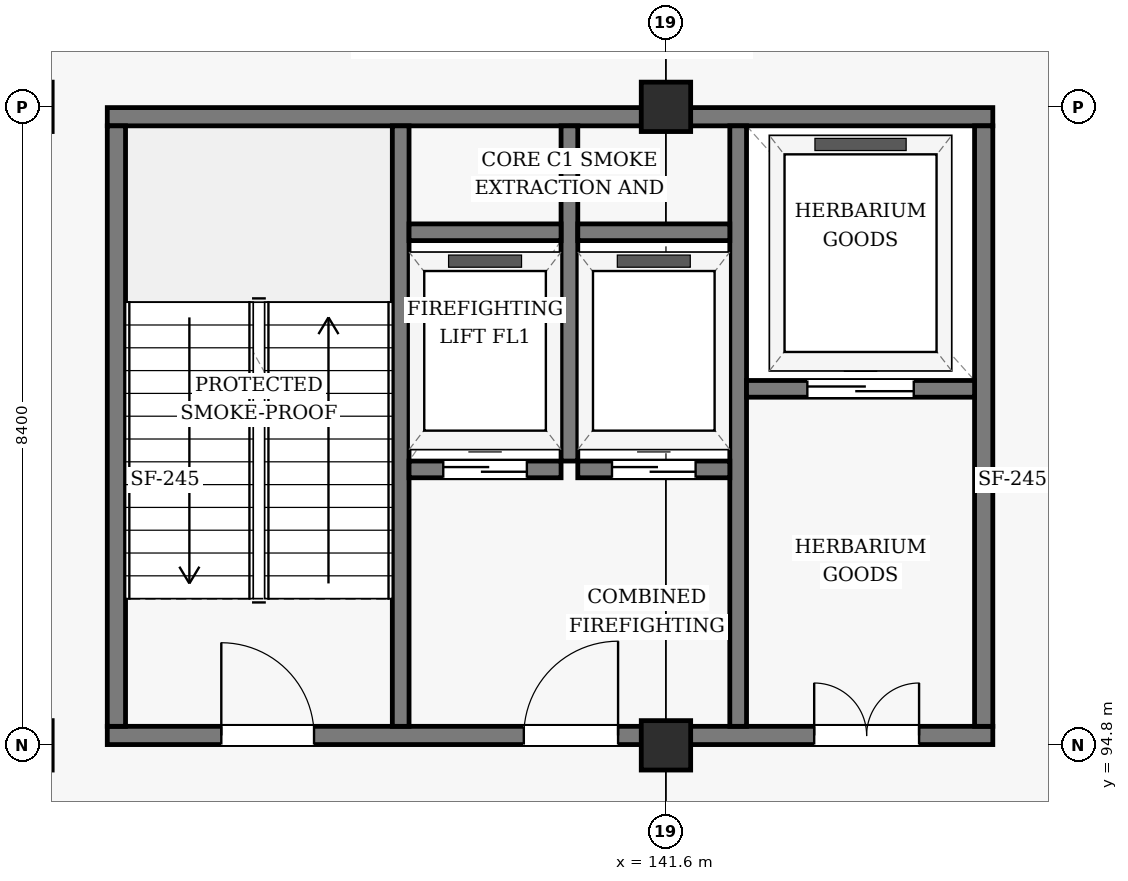
"""IFC4 building model, lengths in metres.
Left out: names, types, materials, properties, quantities, classifications, styles, units other than length and angle.
Written with IfcOpenShell. Run it as: python <this file> out.ifc"""

import sys

from ifc_helpers import new_model, si_unit, direction, frame, frame_2d, origin, origin_2d, place, context, subcontext, project, spatial, rectangle, hollow_rectangle, extrude, element, fill, save


model = new_model("IFC4")
c1 = context("Model", 3, precision=1e-05, world=origin(), true_north=direction((0.0, 1.0)))
c2 = subcontext(c1, "Body", "Model", "MODEL_VIEW")
j1 = project(units=[si_unit("LENGTHUNIT", "METRE"), si_unit("PLANEANGLEUNIT", "RADIAN")], contexts=[c1])
p1 = place(None, origin())
s1 = spatial("IfcSite", under=j1, at=p1, CompositionType="ELEMENT")
p2 = place(p1, origin())
s2 = spatial("IfcBuilding", under=s1, at=p2, CompositionType="ELEMENT")
p3 = place(p2, frame((0.0, 0.0, 9.0)))
s3 = spatial("IfcBuildingStorey", under=s2, at=p3, CompositionType="ELEMENT", Elevation=9.0)
for number, where, z_axis, x_axis in (
    (1, (141.6, 94.8, 0.0), (0.0, 0.0, 1.0), (1.0, 0.0, 0.0)),
    (2, (141.6, 103.2, 0.0), (0.0, 0.0, 1.0), (1.0, 0.0, 0.0)),
):
    element("IfcColumn", number, at=place(p3, frame(where, z_axis=z_axis, x_axis=x_axis)), inside=s3, PredefinedType="COLUMN", context=c2, shape_type="SweptSolid", body=[
        extrude(hollow_rectangle(XDim=0.65, YDim=0.65, WallThickness=0.028, InnerFilletRadius=0.028, OuterFilletRadius=0.056, at=origin_2d()), origin(), (0.0, 0.0, 1.0), 4.2),
    ])
p4 = place(p3, frame((134.25, 94.93, 0.0), z_axis=(0.0, 0.0, 1.0), x_axis=(1.0, 0.0, 0.0)))
e3 = element("IfcWall", 3, at=p4, inside=s3, PredefinedType="SHEAR", context=c2, shape_type="SweptSolid", body=[
    extrude(rectangle(XDim=11.65, YDim=0.24, at=frame_2d((5.825, 0.0))), origin(), (0.0, 0.0, 1.0), 3.935),
])
p5 = place(p4, frame((1.5, 0.0, 0.0)))
e4 = element("IfcOpeningElement", 4, at=p5, cuts=e3, PredefinedType="OPENING", context=c2, shape_type="SweptSolid", body=[
    extrude(rectangle(XDim=1.22, YDim=2.18, at=frame_2d((0.61, 1.09))), frame((0.0, 0.13, 0.0), z_axis=(0.0, -1.0, 0.0), x_axis=(1.0, 0.0, 0.0)), (0.0, 0.0, 1.0), 0.26),
])
p6 = place(p4, frame((5.48, 0.0, 0.0)))
e5 = element("IfcOpeningElement", 5, at=p6, cuts=e3, PredefinedType="OPENING", context=c2, shape_type="SweptSolid", body=[
    extrude(rectangle(XDim=1.24, YDim=2.15, at=frame_2d((0.62, 1.075))), frame((0.0, 0.13, 0.0), z_axis=(0.0, -1.0, 0.0), x_axis=(1.0, 0.0, 0.0)), (0.0, 0.0, 1.0), 0.26),
])
p7 = place(p4, frame((9.3, 0.0, 0.0)))
e6 = element("IfcOpeningElement", 6, at=p7, cuts=e3, PredefinedType="OPENING", context=c2, shape_type="SweptSolid", body=[
    extrude(rectangle(XDim=1.38, YDim=2.15, at=frame_2d((0.69, 1.075))), frame((0.0, 0.13, 0.0), z_axis=(0.0, -1.0, 0.0), x_axis=(1.0, 0.0, 0.0)), (0.0, 0.0, 1.0), 0.26),
])
p8 = place(p3, frame((134.25, 103.07, 0.0), z_axis=(0.0, 0.0, 1.0), x_axis=(1.0, 0.0, 0.0)))
e7 = element("IfcWall", 7, at=p8, inside=s3, PredefinedType="SHEAR", context=c2, shape_type="SweptSolid", body=[
    extrude(rectangle(XDim=11.65, YDim=0.24, at=frame_2d((5.825, 0.0))), origin(), (0.0, 0.0, 1.0), 3.935),
])
p9 = place(p3, frame((134.37, 95.05, 0.0), z_axis=(0.0, 0.0, 1.0), x_axis=(0.0, 1.0, 0.0)))
e8 = element("IfcWall", 8, at=p9, inside=s3, PredefinedType="SHEAR", context=c2, shape_type="SweptSolid", body=[
    extrude(rectangle(XDim=7.9, YDim=0.24, at=frame_2d((3.95, 0.0))), origin(), (0.0, 0.0, 1.0), 3.935),
])
p10 = place(p3, frame((138.11, 95.05, 0.0), z_axis=(0.0, 0.0, 1.0), x_axis=(0.0, 1.0, 0.0)))
e9 = element("IfcWall", 9, at=p10, inside=s3, PredefinedType="SHEAR", context=c2, shape_type="SweptSolid", body=[
    extrude(rectangle(XDim=7.9, YDim=0.22, at=frame_2d((3.95, 0.0))), origin(), (0.0, 0.0, 1.0), 3.935),
])
p11 = place(p3, frame((140.33, 98.54, 0.0), z_axis=(0.0, 0.0, 1.0), x_axis=(0.0, 1.0, 0.0)))
e10 = element("IfcWall", 10, at=p11, inside=s3, PredefinedType="SHEAR", context=c2, shape_type="SweptSolid", body=[
    extrude(rectangle(XDim=4.41, YDim=0.22, at=frame_2d((2.205, 0.0))), origin(), (0.0, 0.0, 1.0), 3.935),
])
p12 = place(p3, frame((142.55, 95.05, 0.0), z_axis=(0.0, 0.0, 1.0), x_axis=(0.0, 1.0, 0.0)))
e11 = element("IfcWall", 11, at=p12, inside=s3, PredefinedType="SHEAR", context=c2, shape_type="SweptSolid", body=[
    extrude(rectangle(XDim=7.9, YDim=0.22, at=frame_2d((3.95, 0.0))), origin(), (0.0, 0.0, 1.0), 3.935),
])
p13 = place(p3, frame((145.78, 95.05, 0.0), z_axis=(0.0, 0.0, 1.0), x_axis=(0.0, 1.0, 0.0)))
e12 = element("IfcWall", 12, at=p13, inside=s3, PredefinedType="SHEAR", context=c2, shape_type="SweptSolid", body=[
    extrude(rectangle(XDim=7.9, YDim=0.24, at=frame_2d((3.95, 0.0))), origin(), (0.0, 0.0, 1.0), 3.935),
])
p14 = place(p3, frame((138.22, 98.43, 0.0), z_axis=(0.0, 0.0, 1.0), x_axis=(1.0, 0.0, 0.0)))
e13 = element("IfcWall", 13, at=p14, inside=s3, PredefinedType="SHEAR", context=c2, shape_type="SweptSolid", body=[
    extrude(rectangle(XDim=2.0, YDim=0.22, at=frame_2d((1.0, 0.0))), origin(), (0.0, 0.0, 1.0), 3.935),
])
p15 = place(p14, frame((0.45, 0.0, 0.0)))
e14 = element("IfcOpeningElement", 14, at=p15, cuts=e13, PredefinedType="OPENING", context=c2, shape_type="SweptSolid", body=[
    extrude(rectangle(XDim=1.1, YDim=2.15, at=frame_2d((0.55, 1.075))), frame((0.0, 0.12, 0.0), z_axis=(0.0, -1.0, 0.0), x_axis=(1.0, 0.0, 0.0)), (0.0, 0.0, 1.0), 0.24),
])
p16 = place(p3, frame((140.44, 98.43, 0.0), z_axis=(0.0, 0.0, 1.0), x_axis=(1.0, 0.0, 0.0)))
e15 = element("IfcWall", 15, at=p16, inside=s3, PredefinedType="SHEAR", context=c2, shape_type="SweptSolid", body=[
    extrude(rectangle(XDim=2.0, YDim=0.22, at=frame_2d((1.0, 0.0))), origin(), (0.0, 0.0, 1.0), 3.935),
])
p17 = place(p16, frame((0.45, 0.0, 0.0)))
e16 = element("IfcOpeningElement", 16, at=p17, cuts=e15, PredefinedType="OPENING", context=c2, shape_type="SweptSolid", body=[
    extrude(rectangle(XDim=1.1, YDim=2.15, at=frame_2d((0.55, 1.075))), frame((0.0, 0.12, 0.0), z_axis=(0.0, -1.0, 0.0), x_axis=(1.0, 0.0, 0.0)), (0.0, 0.0, 1.0), 0.24),
])
for number, where, z_axis, x_axis in (
    (17, (138.22, 101.55, 0.0), (0.0, 0.0, 1.0), (1.0, 0.0, 0.0)),
    (18, (140.44, 101.55, 0.0), (0.0, 0.0, 1.0), (1.0, 0.0, 0.0)),
):
    element("IfcWall", number, at=place(p3, frame(where, z_axis=z_axis, x_axis=x_axis)), inside=s3, PredefinedType="SHEAR", context=c2, shape_type="SweptSolid", body=[
        extrude(rectangle(XDim=2.0, YDim=0.22, at=frame_2d((1.0, 0.0))), origin(), (0.0, 0.0, 1.0), 3.935),
    ])
p18 = place(p3, frame((142.66, 99.49, 0.0), z_axis=(0.0, 0.0, 1.0), x_axis=(1.0, 0.0, 0.0)))
e19 = element("IfcWall", 19, at=p18, inside=s3, PredefinedType="SHEAR", context=c2, shape_type="SweptSolid", body=[
    extrude(rectangle(XDim=3.0, YDim=0.22, at=frame_2d((1.5, 0.0))), origin(), (0.0, 0.0, 1.0), 3.935),
])
p19 = place(p18, frame((0.8, 0.0, 0.0)))
e20 = element("IfcOpeningElement", 20, at=p19, cuts=e19, PredefinedType="OPENING", context=c2, shape_type="SweptSolid", body=[
    extrude(rectangle(XDim=1.4, YDim=2.2, at=frame_2d((0.7, 1.1))), frame((0.0, 0.12, 0.0), z_axis=(0.0, -1.0, 0.0), x_axis=(1.0, 0.0, 0.0)), (0.0, 0.0, 1.0), 0.24),
])
p20 = place(p5, origin())
e21 = element("IfcDoor", 21, at=p20, inside=s3, OperationType="SINGLE_SWING_LEFT", PredefinedType="DOOR", context=c2, shape_type="SweptSolid", body=[
    extrude(rectangle(XDim=1.22, YDim=2.18, at=frame_2d((0.61, 1.09))), frame((0.0, 0.025, 0.0), z_axis=(0.0, -1.0, 0.0), x_axis=(1.0, 0.0, 0.0)), (0.0, 0.0, 1.0), 0.05),
])
fill(e4, e21)
p21 = place(p6, frame((1.24, 0.0, 0.0), z_axis=(0.0, 0.0, 1.0), x_axis=(-1.0, 0.0, 0.0)))
e22 = element("IfcDoor", 22, at=p21, inside=s3, OperationType="SINGLE_SWING_RIGHT", PredefinedType="DOOR", context=c2, shape_type="SweptSolid", body=[
    extrude(rectangle(XDim=1.24, YDim=2.15, at=frame_2d((0.62, 1.075))), frame((0.0, 0.025, 0.0), z_axis=(0.0, -1.0, 0.0), x_axis=(1.0, 0.0, 0.0)), (0.0, 0.0, 1.0), 0.05),
])
fill(e5, e22)
p22 = place(p7, frame((1.38, 0.0, 0.0), z_axis=(0.0, 0.0, 1.0), x_axis=(-1.0, 0.0, 0.0)))
e23 = element("IfcDoor", 23, at=p22, inside=s3, OperationType="DOUBLE_DOOR_SINGLE_SWING", PredefinedType="DOOR", context=c2, shape_type="SweptSolid", body=[
    extrude(rectangle(XDim=1.38, YDim=2.15, at=frame_2d((0.69, 1.075))), frame((0.0, 0.025, 0.0), z_axis=(0.0, -1.0, 0.0), x_axis=(1.0, 0.0, 0.0)), (0.0, 0.0, 1.0), 0.05),
])
fill(e6, e23)
p23 = place(p15, origin())
e24 = element("IfcDoor", 24, at=p23, inside=s3, OperationType="SLIDING_TO_LEFT", PredefinedType="DOOR", context=c2, shape_type="SweptSolid", body=[
    extrude(rectangle(XDim=1.1, YDim=2.15, at=frame_2d((0.55, 1.075))), frame((0.0, 0.025, 0.0), z_axis=(0.0, -1.0, 0.0), x_axis=(1.0, 0.0, 0.0)), (0.0, 0.0, 1.0), 0.05),
])
fill(e14, e24)
p24 = place(p17, origin())
e25 = element("IfcDoor", 25, at=p24, inside=s3, OperationType="SLIDING_TO_LEFT", PredefinedType="DOOR", context=c2, shape_type="SweptSolid", body=[
    extrude(rectangle(XDim=1.1, YDim=2.15, at=frame_2d((0.55, 1.075))), frame((0.0, 0.025, 0.0), z_axis=(0.0, -1.0, 0.0), x_axis=(1.0, 0.0, 0.0)), (0.0, 0.0, 1.0), 0.05),
])
fill(e16, e25)
p25 = place(p19, origin())
e26 = element("IfcDoor", 26, at=p25, inside=s3, OperationType="SLIDING_TO_LEFT", PredefinedType="DOOR", context=c2, shape_type="SweptSolid", body=[
    extrude(rectangle(XDim=1.4, YDim=2.2, at=frame_2d((0.7, 1.1))), frame((0.0, 0.025, 0.0), z_axis=(0.0, -1.0, 0.0), x_axis=(1.0, 0.0, 0.0)), (0.0, 0.0, 1.0), 0.05),
])
fill(e20, e26)
save(model, sys.argv[1])
